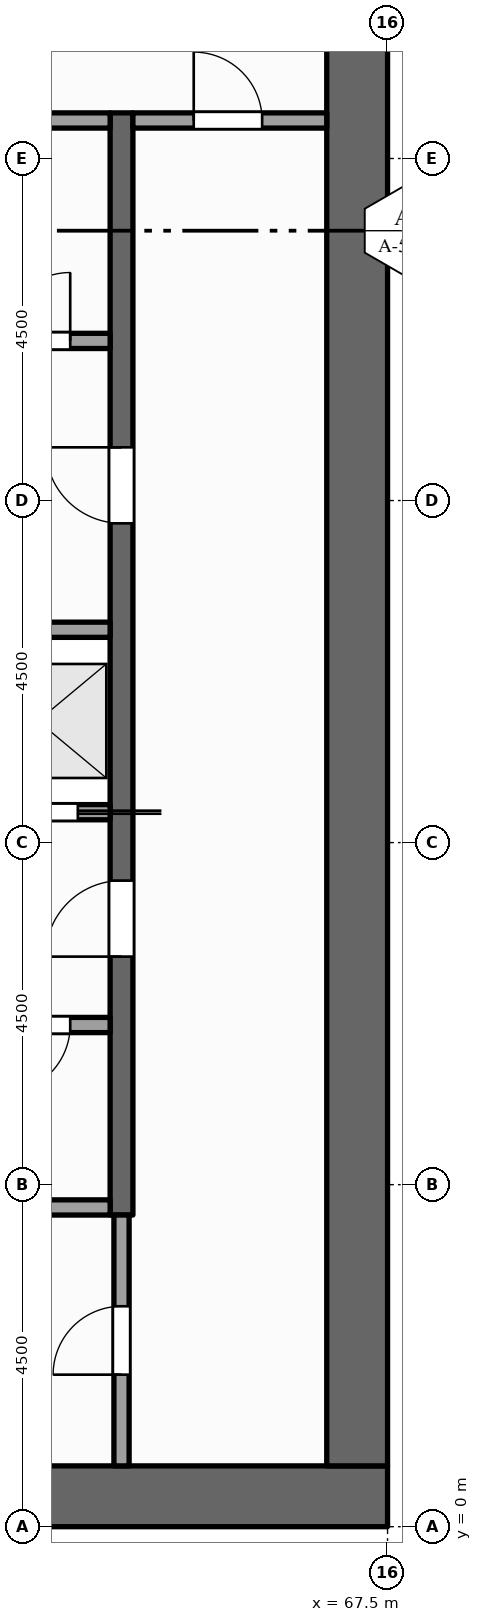
"""IFC4 building model, lengths in metres.
Left out: names, types, materials, properties, quantities, classifications, styles, units other than length and angle.
Written with IfcOpenShell. Run it as: python <this file> out.ifc"""

import sys

from ifc_helpers import new_model, si_unit, direction, frame, frame_2d, origin, place, context, subcontext, project, spatial, rectangle, extrude, element, fill, save


model = new_model("IFC4")
c1 = context("Model", 3, precision=1e-05, world=origin(), true_north=direction((0.0, 1.0)))
c2 = subcontext(c1, "Body", "Model", "MODEL_VIEW")
j1 = project(units=[si_unit("LENGTHUNIT", "METRE"), si_unit("PLANEANGLEUNIT", "RADIAN")], contexts=[c1])
p1 = place(None, origin())
s1 = spatial("IfcSite", under=j1, at=p1, CompositionType="ELEMENT")
p2 = place(p1, origin())
s2 = spatial("IfcBuilding", under=s1, at=p2, CompositionType="ELEMENT")
p3 = place(p2, frame((0.0, 0.0, 269.0)))
s3 = spatial("IfcBuildingStorey", under=s2, at=p3, CompositionType="ELEMENT", Elevation=269.0)
p4 = place(p3, frame((67.5, 0.4, -0.15), z_axis=(0.0, 0.0, 1.0), x_axis=(-1.0, 0.0, 0.0)))
e1 = element("IfcWall", 1, at=p4, inside=s3, PredefinedType="SHEAR", context=c2, shape_type="SweptSolid", body=[
    extrude(rectangle(XDim=13.5, YDim=0.8, at=frame_2d((6.75, 0.0))), origin(), (0.0, 0.0, 1.0), 4.0),
])
p5 = place(p3, frame((67.1, 0.8, -0.15), z_axis=(0.0, 0.0, 1.0), x_axis=(0.0, 1.0, 0.0)))
e2 = element("IfcWall", 2, at=p5, inside=s3, PredefinedType="SHEAR", context=c2, shape_type="SweptSolid", body=[
    extrude(rectangle(XDim=20.9, YDim=0.8, at=frame_2d((10.45, 0.0))), origin(), (0.0, 0.0, 1.0), 4.0),
])
p6 = place(p3, frame((64.0, 0.8, 0.0), z_axis=(0.0, 0.0, 1.0), x_axis=(0.0, 1.0, 0.0)))
e3 = element("IfcWall", 3, at=p6, inside=s3, PredefinedType="PARTITIONING", context=c2, shape_type="SweptSolid", body=[
    extrude(rectangle(XDim=3.3, YDim=0.2, at=frame_2d((1.65, 0.0))), origin(), (0.0, 0.0, 1.0), 3.85),
])
p7 = place(p6, frame((1.2, 0.0, 0.0)))
e4 = element("IfcOpeningElement", 4, at=p7, cuts=e3, PredefinedType="OPENING", context=c2, shape_type="SweptSolid", body=[
    extrude(rectangle(XDim=0.9, YDim=2.1, at=frame_2d((0.45, 1.05))), frame((0.0, 0.11, 0.0), z_axis=(0.0, -1.0, 0.0), x_axis=(1.0, 0.0, 0.0)), (0.0, 0.0, 1.0), 0.22),
])
p8 = place(p3, frame((64.0, 4.1, 0.0), z_axis=(0.0, 0.0, 1.0), x_axis=(0.0, 1.0, 0.0)))
e5 = element("IfcWall", 5, at=p8, inside=s3, PredefinedType="SHEAR", context=c2, shape_type="SweptSolid", body=[
    extrude(rectangle(XDim=14.5, YDim=0.3, at=frame_2d((7.25, 0.0))), origin(), (0.0, 0.0, 1.0), 3.85),
])
p9 = place(p8, frame((3.4, 0.0, 0.0)))
e6 = element("IfcOpeningElement", 6, at=p9, cuts=e5, PredefinedType="OPENING", context=c2, shape_type="SweptSolid", body=[
    extrude(rectangle(XDim=1.0, YDim=2.1, at=frame_2d((0.5, 1.05))), frame((0.0, 0.16, 0.0), z_axis=(0.0, -1.0, 0.0), x_axis=(1.0, 0.0, 0.0)), (0.0, 0.0, 1.0), 0.32),
])
p10 = place(p8, frame((9.1, 0.0, 0.0)))
e7 = element("IfcOpeningElement", 7, at=p10, cuts=e5, PredefinedType="OPENING", context=c2, shape_type="SweptSolid", body=[
    extrude(rectangle(XDim=1.0, YDim=2.1, at=frame_2d((0.5, 1.05))), frame((0.0, 0.16, 0.0), z_axis=(0.0, -1.0, 0.0), x_axis=(1.0, 0.0, 0.0)), (0.0, 0.0, 1.0), 0.32),
])
p11 = place(p3, frame((61.9, 4.2, 0.0), z_axis=(0.0, 0.0, 1.0), x_axis=(1.0, 0.0, 0.0)))
e8 = element("IfcWall", 8, at=p11, inside=s3, PredefinedType="PARTITIONING", context=c2, shape_type="SweptSolid", body=[
    extrude(rectangle(XDim=1.95, YDim=0.2, at=frame_2d((0.975, 0.0))), origin(), (0.0, 0.0, 1.0), 3.85),
])
p12 = place(p3, frame((61.9, 6.6, 0.0), z_axis=(0.0, 0.0, 1.0), x_axis=(1.0, 0.0, 0.0)))
e9 = element("IfcWall", 9, at=p12, inside=s3, PredefinedType="PARTITIONING", context=c2, shape_type="SweptSolid", body=[
    extrude(rectangle(XDim=1.95, YDim=0.2, at=frame_2d((0.975, 0.0))), origin(), (0.0, 0.0, 1.0), 3.85),
])
p13 = place(p12, frame((0.525, 0.0, 0.0)))
e10 = element("IfcOpeningElement", 10, at=p13, cuts=e9, PredefinedType="OPENING", context=c2, shape_type="SweptSolid", body=[
    extrude(rectangle(XDim=0.9, YDim=2.1, at=frame_2d((0.45, 1.05))), frame((0.0, 0.11, 0.0), z_axis=(0.0, -1.0, 0.0), x_axis=(1.0, 0.0, 0.0)), (0.0, 0.0, 1.0), 0.22),
])
p14 = place(p3, frame((61.9, 9.4, 0.0), z_axis=(0.0, 0.0, 1.0), x_axis=(1.0, 0.0, 0.0)))
e11 = element("IfcWall", 11, at=p14, inside=s3, PredefinedType="SOLIDWALL", context=c2, shape_type="SweptSolid", body=[
    extrude(rectangle(XDim=1.95, YDim=0.2, at=frame_2d((0.975, 0.0))), origin(), (0.0, 0.0, 1.0), 3.85),
])
p15 = place(p14, frame((0.425, 0.0, 0.012)))
e12 = element("IfcOpeningElement", 12, at=p15, cuts=e11, PredefinedType="OPENING", context=c2, shape_type="SweptSolid", body=[
    extrude(rectangle(XDim=1.1, YDim=2.1, at=frame_2d((0.55, 1.05))), frame((0.0, 0.11, 0.0), z_axis=(0.0, -1.0, 0.0), x_axis=(1.0, 0.0, 0.0)), (0.0, 0.0, 1.0), 0.22),
])
p16 = place(p3, frame((61.9, 11.8, 0.0), z_axis=(0.0, 0.0, 1.0), x_axis=(1.0, 0.0, 0.0)))
e13 = element("IfcWall", 13, at=p16, inside=s3, PredefinedType="SOLIDWALL", context=c2, shape_type="SweptSolid", body=[
    extrude(rectangle(XDim=1.95, YDim=0.2, at=frame_2d((0.975, 0.0))), origin(), (0.0, 0.0, 1.0), 3.85),
])
p17 = place(p3, frame((61.9, 15.6, 0.0), z_axis=(0.0, 0.0, 1.0), x_axis=(1.0, 0.0, 0.0)))
e14 = element("IfcWall", 14, at=p17, inside=s3, PredefinedType="PARTITIONING", context=c2, shape_type="SweptSolid", body=[
    extrude(rectangle(XDim=1.95, YDim=0.2, at=frame_2d((0.975, 0.0))), origin(), (0.0, 0.0, 1.0), 3.85),
])
p18 = place(p17, frame((0.525, 0.0, 0.0)))
e15 = element("IfcOpeningElement", 15, at=p18, cuts=e14, PredefinedType="OPENING", context=c2, shape_type="SweptSolid", body=[
    extrude(rectangle(XDim=0.9, YDim=2.1, at=frame_2d((0.45, 1.05))), frame((0.0, 0.11, 0.0), z_axis=(0.0, -1.0, 0.0), x_axis=(1.0, 0.0, 0.0)), (0.0, 0.0, 1.0), 0.22),
])
p19 = place(p3, frame((61.9, 18.5, 0.0), z_axis=(0.0, 0.0, 1.0), x_axis=(1.0, 0.0, 0.0)))
e16 = element("IfcWall", 16, at=p19, inside=s3, PredefinedType="PARTITIONING", context=c2, shape_type="SweptSolid", body=[
    extrude(rectangle(XDim=1.95, YDim=0.2, at=frame_2d((0.975, 0.0))), origin(), (0.0, 0.0, 1.0), 3.85),
])
p20 = place(p3, frame((64.15, 18.5, 0.0), z_axis=(0.0, 0.0, 1.0), x_axis=(1.0, 0.0, 0.0)))
e17 = element("IfcWall", 17, at=p20, inside=s3, PredefinedType="PARTITIONING", context=c2, shape_type="SweptSolid", body=[
    extrude(rectangle(XDim=2.55, YDim=0.2, at=frame_2d((1.275, 0.0))), origin(), (0.0, 0.0, 1.0), 3.85),
])
p21 = place(p20, frame((0.8, 0.0, 0.0)))
e18 = element("IfcOpeningElement", 18, at=p21, cuts=e17, PredefinedType="OPENING", context=c2, shape_type="SweptSolid", body=[
    extrude(rectangle(XDim=0.9, YDim=2.1, at=frame_2d((0.45, 1.05))), frame((0.0, 0.11, 0.0), z_axis=(0.0, -1.0, 0.0), x_axis=(1.0, 0.0, 0.0)), (0.0, 0.0, 1.0), 0.22),
])
p22 = place(p15, origin())
e19 = element("IfcDoor", 19, at=p22, inside=s3, OperationType="SLIDING_TO_RIGHT", PredefinedType="DOOR", context=c2, shape_type="SweptSolid", body=[
    extrude(rectangle(XDim=1.1, YDim=2.1, at=frame_2d((0.55, 1.05))), frame((0.0, 0.025, 0.0), z_axis=(0.0, -1.0, 0.0), x_axis=(1.0, 0.0, 0.0)), (0.0, 0.0, 1.0), 0.05),
])
fill(e12, e19)
p23 = place(p9, origin())
e20 = element("IfcDoor", 20, at=p23, inside=s3, OperationType="SINGLE_SWING_LEFT", PredefinedType="DOOR", context=c2, shape_type="SweptSolid", body=[
    extrude(rectangle(XDim=1.0, YDim=2.1, at=frame_2d((0.5, 1.05))), frame((0.0, 0.025, 0.0), z_axis=(0.0, -1.0, 0.0), x_axis=(1.0, 0.0, 0.0)), (0.0, 0.0, 1.0), 0.05),
])
fill(e6, e20)
p24 = place(p10, origin())
e21 = element("IfcDoor", 21, at=p24, inside=s3, OperationType="SINGLE_SWING_RIGHT", PredefinedType="DOOR", context=c2, shape_type="SweptSolid", body=[
    extrude(rectangle(XDim=1.0, YDim=2.1, at=frame_2d((0.5, 1.05))), frame((0.0, 0.025, 0.0), z_axis=(0.0, -1.0, 0.0), x_axis=(1.0, 0.0, 0.0)), (0.0, 0.0, 1.0), 0.05),
])
fill(e7, e21)
p25 = place(p7, origin())
e22 = element("IfcDoor", 22, at=p25, inside=s3, OperationType="SINGLE_SWING_LEFT", PredefinedType="DOOR", context=c2, shape_type="SweptSolid", body=[
    extrude(rectangle(XDim=0.9, YDim=2.1, at=frame_2d((0.45, 1.05))), frame((0.0, 0.025, 0.0), z_axis=(0.0, -1.0, 0.0), x_axis=(1.0, 0.0, 0.0)), (0.0, 0.0, 1.0), 0.05),
])
fill(e4, e22)
p26 = place(p21, origin())
e23 = element("IfcDoor", 23, at=p26, inside=s3, OperationType="SINGLE_SWING_LEFT", PredefinedType="DOOR", context=c2, shape_type="SweptSolid", body=[
    extrude(rectangle(XDim=0.9, YDim=2.1, at=frame_2d((0.45, 1.05))), frame((0.0, 0.025, 0.0), z_axis=(0.0, -1.0, 0.0), x_axis=(1.0, 0.0, 0.0)), (0.0, 0.0, 1.0), 0.05),
])
fill(e18, e23)
p27 = place(p13, origin())
e24 = element("IfcDoor", 24, at=p27, inside=s3, OperationType="SINGLE_SWING_LEFT", PredefinedType="DOOR", context=c2, shape_type="SweptSolid", body=[
    extrude(rectangle(XDim=0.9, YDim=2.1, at=frame_2d((0.45, 1.05))), frame((0.0, 0.025, 0.0), z_axis=(0.0, -1.0, 0.0), x_axis=(1.0, 0.0, 0.0)), (0.0, 0.0, 1.0), 0.05),
])
fill(e10, e24)
p28 = place(p18, origin())
e25 = element("IfcDoor", 25, at=p28, inside=s3, OperationType="SINGLE_SWING_RIGHT", PredefinedType="DOOR", context=c2, shape_type="SweptSolid", body=[
    extrude(rectangle(XDim=0.9, YDim=2.1, at=frame_2d((0.45, 1.05))), frame((0.0, 0.025, 0.0), z_axis=(0.0, -1.0, 0.0), x_axis=(1.0, 0.0, 0.0)), (0.0, 0.0, 1.0), 0.05),
])
fill(e15, e25)
save(model, sys.argv[1])
